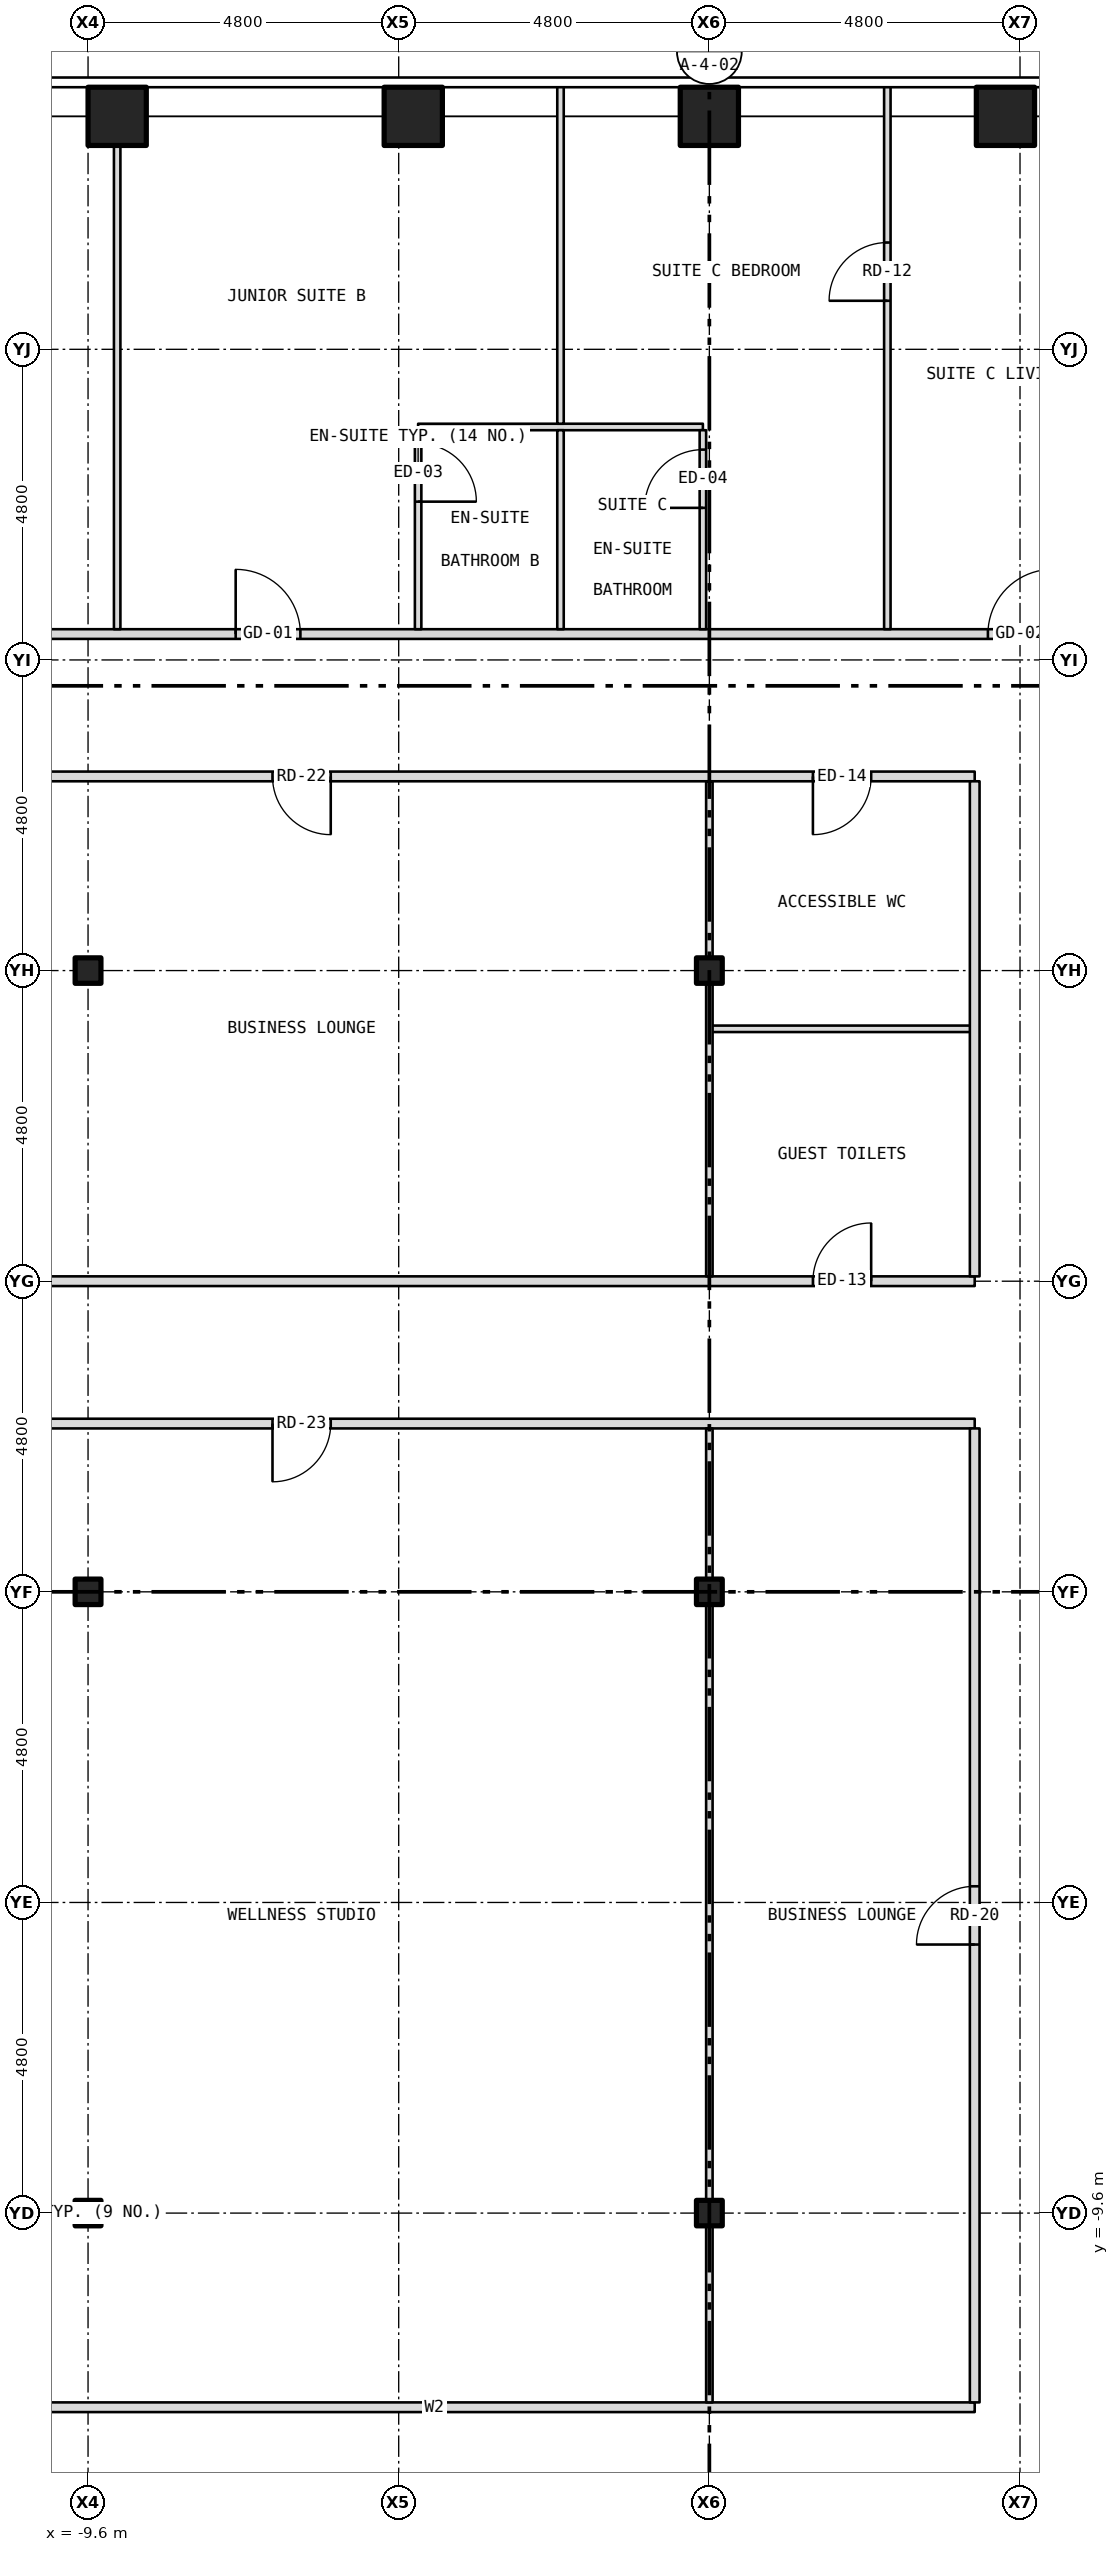
"""IFC4 building model, lengths in metres.
Left out: names, types, materials, properties, quantities, classifications, styles, units other than length and angle.
Written with IfcOpenShell. Run it as: python <this file> out.ifc"""

import sys

from ifc_helpers import new_model, si_unit, direction, frame, frame_2d, origin, origin_2d, place, context, subcontext, project, spatial, rectangle, hollow_rectangle, i_section, extrude, element, fill, save


model = new_model("IFC4")
c1 = context("Model", 3, precision=1e-05, world=origin(), true_north=direction((0.0, 1.0)))
c2 = subcontext(c1, "Body", "Model", "MODEL_VIEW")
j1 = project(units=[si_unit("LENGTHUNIT", "METRE"), si_unit("PLANEANGLEUNIT", "RADIAN")], contexts=[c1])
p1 = place(None, origin())
s1 = spatial("IfcSite", under=j1, at=p1, CompositionType="ELEMENT")
p2 = place(p1, origin())
s2 = spatial("IfcBuilding", under=s1, at=p2, CompositionType="ELEMENT")
p3 = place(p2, frame((0.0, 0.0, 110.0)))
s3 = spatial("IfcBuildingStorey", under=s2, at=p3, CompositionType="ELEMENT", Elevation=110.0)
for number, where, z_axis, x_axis in (
    (1, (-9.15, 22.8, -0.15), (0.0, 0.0, 1.0), (1.0, 0.0, 0.0)),
    (2, (-4.575, 22.8, -0.15), (0.0, 0.0, 1.0), (1.0, 0.0, 0.0)),
    (3, (0.0, 22.8, -0.15), (0.0, 0.0, 1.0), (1.0, 0.0, 0.0)),
    (4, (4.575, 22.8, -0.15), (0.0, 0.0, 1.0), (1.0, 0.0, 0.0)),
):
    element("IfcColumn", number, at=place(p3, frame(where, z_axis=z_axis, x_axis=x_axis)), inside=s3, PredefinedType="COLUMN", context=c2, shape_type="SweptSolid", body=[
        extrude(hollow_rectangle(XDim=0.9, YDim=0.9, WallThickness=0.05, at=origin_2d()), origin(), (0.0, 0.0, 1.0), 3.5),
    ])
for number, where, z_axis, x_axis in (
    (5, (-9.6, -9.6, -0.15), (0.0, 0.0, 1.0), (1.0, 0.0, 0.0)),
    (6, (-9.6, 0.0, -0.15), (0.0, 0.0, 1.0), (1.0, 0.0, 0.0)),
    (7, (-9.6, 9.6, -0.15), (0.0, 0.0, 1.0), (1.0, 0.0, 0.0)),
    (8, (0.0, -9.6, -0.15), (0.0, 0.0, 1.0), (1.0, 0.0, 0.0)),
    (9, (0.0, 0.0, -0.15), (0.0, 0.0, 1.0), (1.0, 0.0, 0.0)),
    (10, (0.0, 9.6, -0.15), (0.0, 0.0, 1.0), (1.0, 0.0, 0.0)),
):
    element("IfcColumn", number, at=place(p3, frame(where, z_axis=z_axis, x_axis=x_axis)), inside=s3, PredefinedType="COLUMN", context=c2, shape_type="SweptSolid", body=[
        extrude(i_section(OverallWidth=0.399, OverallDepth=0.394, WebThickness=0.023, FlangeThickness=0.037, at=origin_2d()), origin(), (0.0, 0.0, 1.0), 3.5),
    ])
p4 = place(p3, frame((-12.6, -12.6, 0.0), z_axis=(0.0, 0.0, 1.0), x_axis=(1.0, 0.0, 0.0)))
e11 = element("IfcWall", 11, at=p4, inside=s3, PredefinedType="PARTITIONING", context=c2, shape_type="SweptSolid", body=[
    extrude(rectangle(XDim=16.7, YDim=0.15, at=frame_2d((8.35, 0.0))), origin(), (0.0, 0.0, 1.0), 3.35),
])
p5 = place(p3, frame((-12.6, 2.6, 0.0), z_axis=(0.0, 0.0, 1.0), x_axis=(1.0, 0.0, 0.0)))
e12 = element("IfcWall", 12, at=p5, inside=s3, PredefinedType="PARTITIONING", context=c2, shape_type="SweptSolid", body=[
    extrude(rectangle(XDim=16.7, YDim=0.15, at=frame_2d((8.35, 0.0))), origin(), (0.0, 0.0, 1.0), 3.35),
])
p6 = place(p5, frame((5.85, 0.0, 0.0)))
e13 = element("IfcOpeningElement", 13, at=p6, cuts=e12, PredefinedType="OPENING", context=c2, shape_type="SweptSolid", body=[
    extrude(rectangle(XDim=0.9, YDim=2.1, at=frame_2d((0.45, 1.05))), frame((0.0, 0.087, 0.0), z_axis=(0.0, -1.0, 0.0), x_axis=(1.0, 0.0, 0.0)), (0.0, 0.0, 1.0), 0.174),
])
p7 = place(p3, frame((-12.6, 4.8, 0.0), z_axis=(0.0, 0.0, 1.0), x_axis=(1.0, 0.0, 0.0)))
e14 = element("IfcWall", 14, at=p7, inside=s3, PredefinedType="PARTITIONING", context=c2, shape_type="SweptSolid", body=[
    extrude(rectangle(XDim=16.7, YDim=0.15, at=frame_2d((8.35, 0.0))), origin(), (0.0, 0.0, 1.0), 3.35),
])
p8 = place(p7, frame((14.2, 0.0, 0.0)))
e15 = element("IfcOpeningElement", 15, at=p8, cuts=e14, PredefinedType="OPENING", context=c2, shape_type="SweptSolid", body=[
    extrude(rectangle(XDim=0.9, YDim=2.1, at=frame_2d((0.45, 1.05))), frame((0.0, 0.087, 0.0), z_axis=(0.0, -1.0, 0.0), x_axis=(1.0, 0.0, 0.0)), (0.0, 0.0, 1.0), 0.174),
])
p9 = place(p3, frame((0.0, 8.7, 0.0), z_axis=(0.0, 0.0, 1.0), x_axis=(1.0, 0.0, 0.0)))
e16 = element("IfcWall", 16, at=p9, inside=s3, PredefinedType="PARTITIONING", context=c2, shape_type="SweptSolid", body=[
    extrude(rectangle(XDim=4.1, YDim=0.1, at=frame_2d((2.05, 0.0))), origin(), (0.0, 0.0, 1.0), 3.35),
])
p10 = place(p3, frame((-12.6, 12.6, 0.0), z_axis=(0.0, 0.0, 1.0), x_axis=(1.0, 0.0, 0.0)))
e17 = element("IfcWall", 17, at=p10, inside=s3, PredefinedType="PARTITIONING", context=c2, shape_type="SweptSolid", body=[
    extrude(rectangle(XDim=16.7, YDim=0.15, at=frame_2d((8.35, 0.0))), origin(), (0.0, 0.0, 1.0), 3.35),
])
p11 = place(p10, frame((14.2, 0.0, 0.0)))
e18 = element("IfcOpeningElement", 18, at=p11, cuts=e17, PredefinedType="OPENING", context=c2, shape_type="SweptSolid", body=[
    extrude(rectangle(XDim=0.9, YDim=2.1, at=frame_2d((0.45, 1.05))), frame((0.0, 0.087, 0.0), z_axis=(0.0, -1.0, 0.0), x_axis=(1.0, 0.0, 0.0)), (0.0, 0.0, 1.0), 0.174),
])
p12 = place(p10, frame((5.85, 0.0, 0.0)))
e19 = element("IfcOpeningElement", 19, at=p12, cuts=e17, PredefinedType="OPENING", context=c2, shape_type="SweptSolid", body=[
    extrude(rectangle(XDim=0.9, YDim=2.1, at=frame_2d((0.45, 1.05))), frame((0.0, 0.087, 0.0), z_axis=(0.0, -1.0, 0.0), x_axis=(1.0, 0.0, 0.0)), (0.0, 0.0, 1.0), 0.174),
])
p13 = place(p3, frame((-14.8, 14.8, 0.0), z_axis=(0.0, 0.0, 1.0), x_axis=(1.0, 0.0, 0.0)))
e20 = element("IfcWall", 20, at=p13, inside=s3, PredefinedType="PARTITIONING", context=c2, shape_type="SweptSolid", body=[
    extrude(rectangle(XDim=29.6, YDim=0.15, at=frame_2d((14.8, 0.0))), origin(), (0.0, 0.0, 1.0), 3.35),
])
p14 = place(p13, frame((2.913, 0.0, 0.0)))
e21 = element("IfcOpeningElement", 21, at=p14, cuts=e20, PredefinedType="OPENING", context=c2, shape_type="SweptSolid", body=[
    extrude(rectangle(XDim=0.9, YDim=2.1, at=frame_2d((0.45, 1.05))), frame((0.0, 0.087, 0.0), z_axis=(0.0, -1.0, 0.0), x_axis=(1.0, 0.0, 0.0)), (0.0, 0.0, 1.0), 0.174),
])
p15 = place(p13, frame((7.481, 0.0, 0.0)))
e22 = element("IfcOpeningElement", 22, at=p15, cuts=e20, PredefinedType="OPENING", context=c2, shape_type="SweptSolid", body=[
    extrude(rectangle(XDim=1.0, YDim=2.1, at=frame_2d((0.5, 1.05))), frame((0.0, 0.087, 0.0), z_axis=(0.0, -1.0, 0.0), x_axis=(1.0, 0.0, 0.0)), (0.0, 0.0, 1.0), 0.174),
])
p16 = place(p13, frame((19.104, 0.0, 0.0)))
e23 = element("IfcOpeningElement", 23, at=p16, cuts=e20, PredefinedType="OPENING", context=c2, shape_type="SweptSolid", body=[
    extrude(rectangle(XDim=1.0, YDim=2.1, at=frame_2d((0.5, 1.05))), frame((0.0, 0.087, 0.0), z_axis=(0.0, -1.0, 0.0), x_axis=(1.0, 0.0, 0.0)), (0.0, 0.0, 1.0), 0.174),
])
p17 = place(p13, frame((23.494, 0.0, 0.0)))
e24 = element("IfcOpeningElement", 24, at=p17, cuts=e20, PredefinedType="OPENING", context=c2, shape_type="SweptSolid", body=[
    extrude(rectangle(XDim=1.0, YDim=2.1, at=frame_2d((0.5, 1.05))), frame((0.0, 0.087, 0.0), z_axis=(0.0, -1.0, 0.0), x_axis=(1.0, 0.0, 0.0)), (0.0, 0.0, 1.0), 0.174),
])
p18 = place(p3, frame((-4.5, 18.0, 0.0), z_axis=(0.0, 0.0, 1.0), x_axis=(1.0, 0.0, 0.0)))
e25 = element("IfcWall", 25, at=p18, inside=s3, PredefinedType="PARTITIONING", context=c2, shape_type="SweptSolid", body=[
    extrude(rectangle(XDim=4.4, YDim=0.1, at=frame_2d((2.2, 0.0))), origin(), (0.0, 0.0, 1.0), 3.35),
])
p19 = place(p3, frame((-9.15, 14.875, 0.0), z_axis=(0.0, 0.0, 1.0), x_axis=(0.0, 1.0, 0.0)))
e26 = element("IfcWall", 26, at=p19, inside=s3, PredefinedType="PARTITIONING", context=c2, shape_type="SweptSolid", body=[
    extrude(rectangle(XDim=7.805, YDim=0.1, at=frame_2d((3.902, 0.0))), origin(), (0.0, 0.0, 1.0), 3.35),
])
p20 = place(p3, frame((-4.5, 14.875, 0.0), z_axis=(0.0, 0.0, 1.0), x_axis=(0.0, 1.0, 0.0)))
e27 = element("IfcWall", 27, at=p20, inside=s3, PredefinedType="PARTITIONING", context=c2, shape_type="SweptSolid", body=[
    extrude(rectangle(XDim=3.075, YDim=0.1, at=frame_2d((1.538, 0.0))), origin(), (0.0, 0.0, 1.0), 3.35),
])
p21 = place(p20, frame((1.971, 0.0, 0.0)))
e28 = element("IfcOpeningElement", 28, at=p21, cuts=e27, PredefinedType="OPENING", context=c2, shape_type="SweptSolid", body=[
    extrude(rectangle(XDim=0.9, YDim=2.1, at=frame_2d((0.45, 1.05))), frame((0.0, 0.062, 0.0), z_axis=(0.0, -1.0, 0.0), x_axis=(1.0, 0.0, 0.0)), (0.0, 0.0, 1.0), 0.124),
])
p22 = place(p3, frame((-2.3, 14.875, 0.0), z_axis=(0.0, 0.0, 1.0), x_axis=(0.0, 1.0, 0.0)))
e29 = element("IfcWall", 29, at=p22, inside=s3, PredefinedType="PARTITIONING", context=c2, shape_type="SweptSolid", body=[
    extrude(rectangle(XDim=3.075, YDim=0.1, at=frame_2d((1.538, 0.0))), origin(), (0.0, 0.0, 1.0), 3.35),
])
p23 = place(p3, frame((-2.3, 18.05, 0.0), z_axis=(0.0, 0.0, 1.0), x_axis=(0.0, 1.0, 0.0)))
e30 = element("IfcWall", 30, at=p23, inside=s3, PredefinedType="PARTITIONING", context=c2, shape_type="SweptSolid", body=[
    extrude(rectangle(XDim=5.23, YDim=0.1, at=frame_2d((2.615, 0.0))), origin(), (0.0, 0.0, 1.0), 3.35),
])
p24 = place(p3, frame((-0.1, 14.875, 0.0), z_axis=(0.0, 0.0, 1.0), x_axis=(0.0, 1.0, 0.0)))
e31 = element("IfcWall", 31, at=p24, inside=s3, PredefinedType="PARTITIONING", context=c2, shape_type="SweptSolid", body=[
    extrude(rectangle(XDim=3.075, YDim=0.1, at=frame_2d((1.538, 0.0))), origin(), (0.0, 0.0, 1.0), 2.728),
])
p25 = place(p24, frame((1.875, 0.0, 0.0)))
e32 = element("IfcOpeningElement", 32, at=p25, cuts=e31, PredefinedType="OPENING", context=c2, shape_type="SweptSolid", body=[
    extrude(rectangle(XDim=0.9, YDim=2.1, at=frame_2d((0.45, 1.05))), frame((0.0, 0.062, 0.0), z_axis=(0.0, -1.0, 0.0), x_axis=(1.0, 0.0, 0.0)), (0.0, 0.0, 1.0), 0.124),
])
p26 = place(p3, frame((0.0, -12.525, 0.0), z_axis=(0.0, 0.0, 1.0), x_axis=(0.0, 1.0, 0.0)))
e33 = element("IfcWall", 33, at=p26, inside=s3, PredefinedType="PARTITIONING", context=c2, shape_type="SweptSolid", body=[
    extrude(rectangle(XDim=2.726, YDim=0.1, at=frame_2d((1.363, 0.0))), origin(), (0.0, 0.0, 1.0), 2.728),
])
p27 = place(p3, frame((0.0, -9.799, 0.0), z_axis=(0.0, 0.0, 1.0), x_axis=(0.0, 1.0, 0.0)))
e34 = element("IfcWall", 34, at=p27, inside=s3, PredefinedType="PARTITIONING", context=c2, shape_type="SweptSolid", body=[
    extrude(rectangle(XDim=0.398, YDim=0.1, at=frame_2d((0.199, 0.0))), origin(), (0.0, 0.0, 1.0), 3.35),
])
p28 = place(p3, frame((0.0, -9.401, 0.0), z_axis=(0.0, 0.0, 1.0), x_axis=(0.0, 1.0, 0.0)))
e35 = element("IfcWall", 35, at=p28, inside=s3, PredefinedType="PARTITIONING", context=c2, shape_type="SweptSolid", body=[
    extrude(rectangle(XDim=9.202, YDim=0.1, at=frame_2d((4.601, 0.0))), origin(), (0.0, 0.0, 1.0), 2.728),
])
p29 = place(p3, frame((0.0, -0.199, 0.0), z_axis=(0.0, 0.0, 1.0), x_axis=(0.0, 1.0, 0.0)))
e36 = element("IfcWall", 36, at=p29, inside=s3, PredefinedType="PARTITIONING", context=c2, shape_type="SweptSolid", body=[
    extrude(rectangle(XDim=0.398, YDim=0.1, at=frame_2d((0.199, 0.0))), origin(), (0.0, 0.0, 1.0), 3.35),
])
p30 = place(p3, frame((0.0, 0.199, 0.0), z_axis=(0.0, 0.0, 1.0), x_axis=(0.0, 1.0, 0.0)))
e37 = element("IfcWall", 37, at=p30, inside=s3, PredefinedType="PARTITIONING", context=c2, shape_type="SweptSolid", body=[
    extrude(rectangle(XDim=2.326, YDim=0.1, at=frame_2d((1.163, 0.0))), origin(), (0.0, 0.0, 1.0), 2.728),
])
p31 = place(p3, frame((0.0, 4.875, 0.0), z_axis=(0.0, 0.0, 1.0), x_axis=(0.0, 1.0, 0.0)))
e38 = element("IfcWall", 38, at=p31, inside=s3, PredefinedType="PARTITIONING", context=c2, shape_type="SweptSolid", body=[
    extrude(rectangle(XDim=4.526, YDim=0.1, at=frame_2d((2.263, 0.0))), origin(), (0.0, 0.0, 1.0), 2.728),
])
p32 = place(p3, frame((0.0, 9.401, 0.0), z_axis=(0.0, 0.0, 1.0), x_axis=(0.0, 1.0, 0.0)))
e39 = element("IfcWall", 39, at=p32, inside=s3, PredefinedType="PARTITIONING", context=c2, shape_type="SweptSolid", body=[
    extrude(rectangle(XDim=0.398, YDim=0.1, at=frame_2d((0.199, 0.0))), origin(), (0.0, 0.0, 1.0), 3.35),
])
p33 = place(p3, frame((0.0, 9.799, 0.0), z_axis=(0.0, 0.0, 1.0), x_axis=(0.0, 1.0, 0.0)))
e40 = element("IfcWall", 40, at=p33, inside=s3, PredefinedType="PARTITIONING", context=c2, shape_type="SweptSolid", body=[
    extrude(rectangle(XDim=2.726, YDim=0.1, at=frame_2d((1.363, 0.0))), origin(), (0.0, 0.0, 1.0), 2.728),
])
p34 = place(p3, frame((2.75, 14.875, 0.0), z_axis=(0.0, 0.0, 1.0), x_axis=(0.0, 1.0, 0.0)))
e41 = element("IfcWall", 41, at=p34, inside=s3, PredefinedType="PARTITIONING", context=c2, shape_type="SweptSolid", body=[
    extrude(rectangle(XDim=8.405, YDim=0.1, at=frame_2d((4.203, 0.0))), origin(), (0.0, 0.0, 1.0), 3.35),
])
p35 = place(p34, frame((5.075, 0.0, 0.0)))
e42 = element("IfcOpeningElement", 42, at=p35, cuts=e41, PredefinedType="OPENING", context=c2, shape_type="SweptSolid", body=[
    extrude(rectangle(XDim=0.9, YDim=2.1, at=frame_2d((0.45, 1.05))), frame((0.0, 0.062, 0.0), z_axis=(0.0, -1.0, 0.0), x_axis=(1.0, 0.0, 0.0)), (0.0, 0.0, 1.0), 0.124),
])
p36 = place(p3, frame((4.1, -12.525, 0.0), z_axis=(0.0, 0.0, 1.0), x_axis=(0.0, 1.0, 0.0)))
e43 = element("IfcWall", 43, at=p36, inside=s3, PredefinedType="PARTITIONING", context=c2, shape_type="SweptSolid", body=[
    extrude(rectangle(XDim=15.05, YDim=0.15, at=frame_2d((7.525, 0.0))), origin(), (0.0, 0.0, 1.0), 3.35),
])
p37 = place(p36, frame((7.075, 0.0, 0.0)))
e44 = element("IfcOpeningElement", 44, at=p37, cuts=e43, PredefinedType="OPENING", context=c2, shape_type="SweptSolid", body=[
    extrude(rectangle(XDim=0.9, YDim=2.1, at=frame_2d((0.45, 1.05))), frame((0.0, 0.087, 0.0), z_axis=(0.0, -1.0, 0.0), x_axis=(1.0, 0.0, 0.0)), (0.0, 0.0, 1.0), 0.174),
])
p38 = place(p3, frame((4.1, 4.875, 0.0), z_axis=(0.0, 0.0, 1.0), x_axis=(0.0, 1.0, 0.0)))
e45 = element("IfcWall", 45, at=p38, inside=s3, PredefinedType="PARTITIONING", context=c2, shape_type="SweptSolid", body=[
    extrude(rectangle(XDim=7.65, YDim=0.15, at=frame_2d((3.825, 0.0))), origin(), (0.0, 0.0, 1.0), 3.35),
])
p39 = place(p15, origin())
e46 = element("IfcDoor", 46, at=p39, inside=s3, OperationType="SINGLE_SWING_LEFT", PredefinedType="DOOR", context=c2, shape_type="SweptSolid", body=[
    extrude(rectangle(XDim=1.0, YDim=2.1, at=frame_2d((0.5, 1.05))), frame((0.0, 0.025, 0.0), z_axis=(0.0, -1.0, 0.0), x_axis=(1.0, 0.0, 0.0)), (0.0, 0.0, 1.0), 0.05),
])
fill(e22, e46)
p40 = place(p21, origin())
e47 = element("IfcDoor", 47, at=p40, inside=s3, OperationType="SINGLE_SWING_LEFT", PredefinedType="DOOR", context=c2, shape_type="SweptSolid", body=[
    extrude(rectangle(XDim=0.9, YDim=2.1, at=frame_2d((0.45, 1.05))), frame((0.0, 0.025, 0.0), z_axis=(0.0, -1.0, 0.0), x_axis=(1.0, 0.0, 0.0)), (0.0, 0.0, 1.0), 0.05),
])
fill(e28, e47)
p41 = place(p16, origin())
e48 = element("IfcDoor", 48, at=p41, inside=s3, OperationType="SINGLE_SWING_RIGHT", PredefinedType="DOOR", context=c2, shape_type="SweptSolid", body=[
    extrude(rectangle(XDim=1.0, YDim=2.1, at=frame_2d((0.5, 1.05))), frame((0.0, 0.025, 0.0), z_axis=(0.0, -1.0, 0.0), x_axis=(1.0, 0.0, 0.0)), (0.0, 0.0, 1.0), 0.05),
])
fill(e23, e48)
p42 = place(p35, origin())
e49 = element("IfcDoor", 49, at=p42, inside=s3, OperationType="SINGLE_SWING_LEFT", PredefinedType="DOOR", context=c2, shape_type="SweptSolid", body=[
    extrude(rectangle(XDim=0.9, YDim=2.1, at=frame_2d((0.45, 1.05))), frame((0.0, 0.025, 0.0), z_axis=(0.0, -1.0, 0.0), x_axis=(1.0, 0.0, 0.0)), (0.0, 0.0, 1.0), 0.05),
])
fill(e42, e49)
p43 = place(p25, origin())
e50 = element("IfcDoor", 50, at=p43, inside=s3, OperationType="SINGLE_SWING_LEFT", PredefinedType="DOOR", context=c2, shape_type="SweptSolid", body=[
    extrude(rectangle(XDim=0.9, YDim=2.1, at=frame_2d((0.45, 1.05))), frame((0.0, 0.025, 0.0), z_axis=(0.0, -1.0, 0.0), x_axis=(1.0, 0.0, 0.0)), (0.0, 0.0, 1.0), 0.05),
])
fill(e32, e50)
p44 = place(p8, origin())
e51 = element("IfcDoor", 51, at=p44, inside=s3, OperationType="SINGLE_SWING_RIGHT", PredefinedType="DOOR", context=c2, shape_type="SweptSolid", body=[
    extrude(rectangle(XDim=0.9, YDim=2.1, at=frame_2d((0.45, 1.05))), frame((0.0, 0.025, 0.0), z_axis=(0.0, -1.0, 0.0), x_axis=(1.0, 0.0, 0.0)), (0.0, 0.0, 1.0), 0.05),
])
fill(e15, e51)
p45 = place(p11, origin())
e52 = element("IfcDoor", 52, at=p45, inside=s3, OperationType="SINGLE_SWING_LEFT", PredefinedType="DOOR", context=c2, shape_type="SweptSolid", body=[
    extrude(rectangle(XDim=0.9, YDim=2.1, at=frame_2d((0.45, 1.05))), frame((0.0, 0.025, 0.0), z_axis=(0.0, -1.0, 0.0), x_axis=(1.0, 0.0, 0.0)), (0.0, 0.0, 1.0), 0.05),
])
fill(e18, e52)
p46 = place(p37, origin())
e53 = element("IfcDoor", 53, at=p46, inside=s3, OperationType="SINGLE_SWING_LEFT", PredefinedType="DOOR", context=c2, shape_type="SweptSolid", body=[
    extrude(rectangle(XDim=0.9, YDim=2.1, at=frame_2d((0.45, 1.05))), frame((0.0, 0.025, 0.0), z_axis=(0.0, -1.0, 0.0), x_axis=(1.0, 0.0, 0.0)), (0.0, 0.0, 1.0), 0.05),
])
fill(e44, e53)
p47 = place(p12, origin())
e54 = element("IfcDoor", 54, at=p47, inside=s3, OperationType="SINGLE_SWING_RIGHT", PredefinedType="DOOR", context=c2, shape_type="SweptSolid", body=[
    extrude(rectangle(XDim=0.9, YDim=2.1, at=frame_2d((0.45, 1.05))), frame((0.0, 0.025, 0.0), z_axis=(0.0, -1.0, 0.0), x_axis=(1.0, 0.0, 0.0)), (0.0, 0.0, 1.0), 0.05),
])
fill(e19, e54)
p48 = place(p6, origin())
e55 = element("IfcDoor", 55, at=p48, inside=s3, OperationType="SINGLE_SWING_LEFT", PredefinedType="DOOR", context=c2, shape_type="SweptSolid", body=[
    extrude(rectangle(XDim=0.9, YDim=2.1, at=frame_2d((0.45, 1.05))), frame((0.0, 0.025, 0.0), z_axis=(0.0, -1.0, 0.0), x_axis=(1.0, 0.0, 0.0)), (0.0, 0.0, 1.0), 0.05),
])
fill(e13, e55)
save(model, sys.argv[1])
